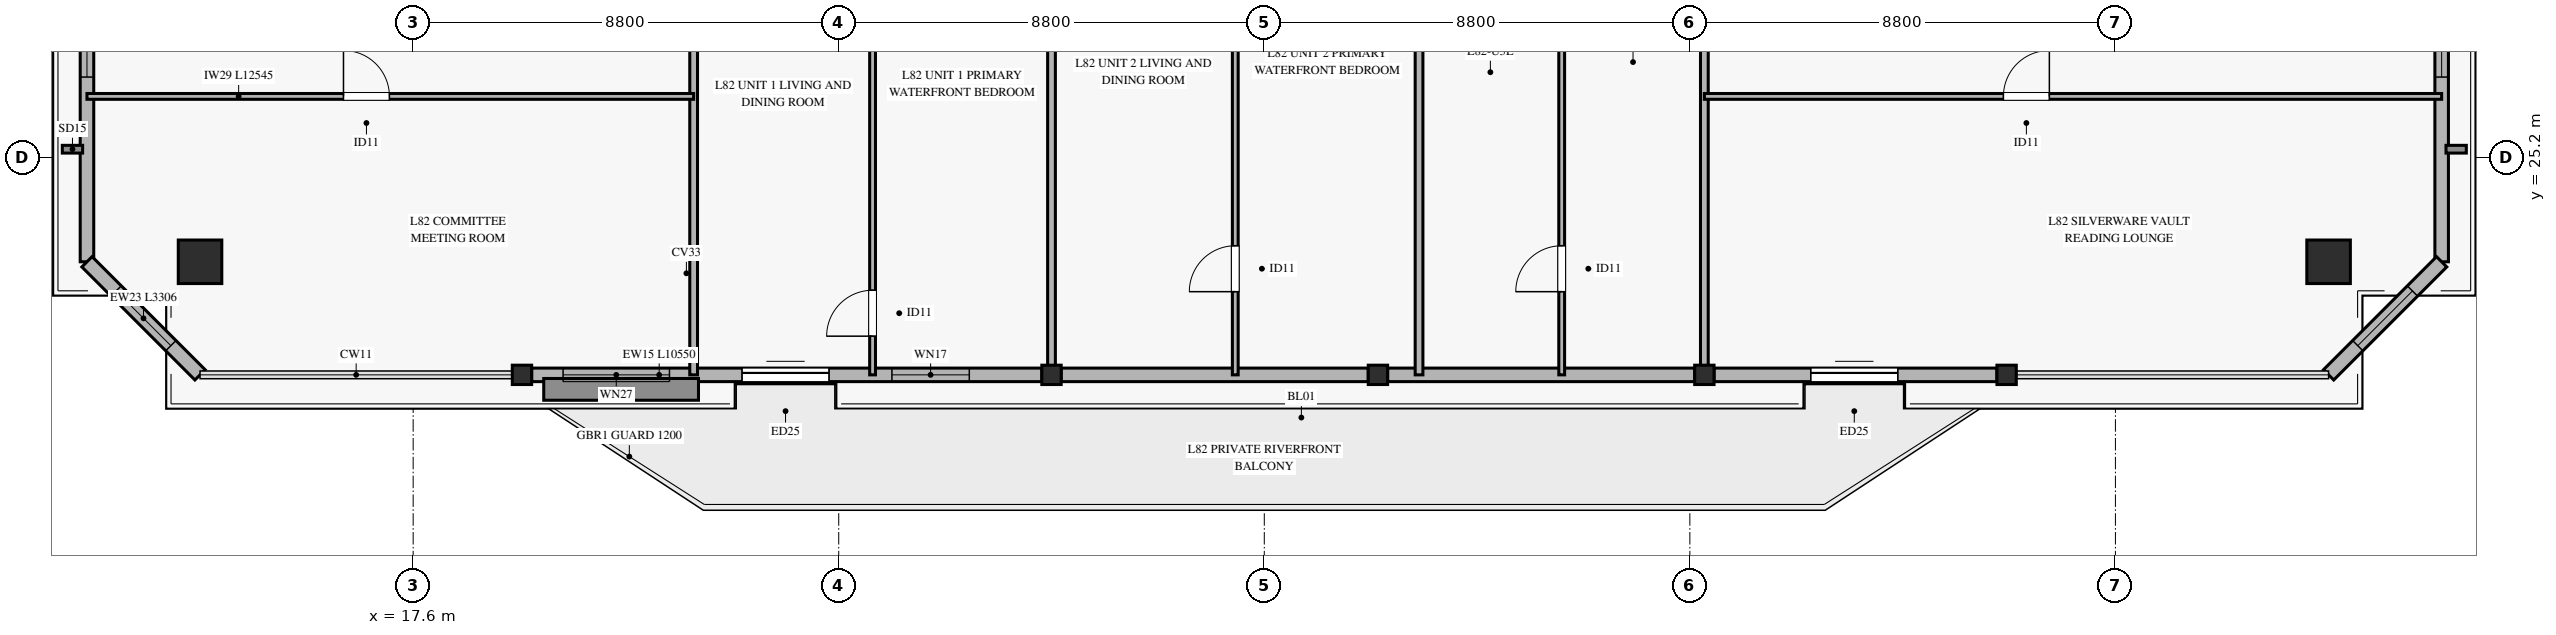
"""IFC4 building model, lengths in metres.
Left out: names, types, materials, properties, quantities, classifications, styles, units other than length and angle.
Written with IfcOpenShell. Run it as: python <this file> out.ifc"""

import sys

from ifc_helpers import new_model, si_unit, direction, frame, frame_2d, origin, origin_2d, place, context, subcontext, project, spatial, rectangle, hollow_rectangle, extrude, source, transform, mapped, element, fill, save


model = new_model("IFC4")
c1 = context("Model", 3, precision=1e-05, world=origin(), true_north=direction((0.0, 1.0)))
c2 = subcontext(c1, "Body", "Model", "MODEL_VIEW")
j1 = project(units=[si_unit("LENGTHUNIT", "METRE"), si_unit("PLANEANGLEUNIT", "RADIAN")], contexts=[c1])
p1 = place(None, origin())
s1 = spatial("IfcSite", under=j1, at=p1, CompositionType="ELEMENT")
p2 = place(p1, origin())
s2 = spatial("IfcBuilding", under=s1, at=p2, CompositionType="ELEMENT")
p3 = place(p2, frame((0.0, 0.0, 317.6)))
s3 = spatial("IfcBuildingStorey", under=s2, at=p3, CompositionType="ELEMENT", Elevation=317.6)
m1 = source(origin(), c2, "Body", "SweptSolid", [
    extrude(hollow_rectangle(XDim=0.9, YDim=0.9, WallThickness=0.04, at=origin_2d()), origin(), (0.0, 0.0, 1.0), 3.185),
])
for number, where, z_axis, x_axis in (
    (1, (13.193, 23.042, 0.0), (0.0, 0.0, 1.0), (1.0, 0.0, 0.0)),
    (2, (57.208, 23.042, 0.0), (0.0, 0.0, 1.0), (1.0, 0.0, 0.0)),
):
    element("IfcColumn", number, at=place(p3, frame(where, z_axis=z_axis, x_axis=x_axis)), inside=s3, PredefinedType="COLUMN", context=c2, shape_type="MappedRepresentation", body=[
        mapped(m1, transform((0.0, 0.0, 0.0), x_axis=(1.0, 0.0, 0.0), y_axis=(0.0, 1.0, 0.0), z_axis=(0.0, 0.0, 1.0), scale=1.0)),
    ])
m2 = source(origin(), c2, "Body", "SweptSolid", [
    extrude(hollow_rectangle(XDim=0.4, YDim=0.4, WallThickness=0.02, at=origin_2d()), origin(), (0.0, 0.0, 1.0), 3.185),
])
for number, where, z_axis, x_axis in (
    (3, (19.85, 20.704, 0.0), (0.0, 0.0, 1.0), (1.0, 0.0, 0.0)),
    (4, (30.8, 20.704, 0.0), (0.0, 0.0, 1.0), (1.0, 0.0, 0.0)),
    (5, (37.55, 20.704, 0.0), (0.0, 0.0, 1.0), (1.0, 0.0, 0.0)),
    (6, (44.3, 20.704, 0.0), (0.0, 0.0, 1.0), (1.0, 0.0, 0.0)),
    (7, (50.55, 20.704, 0.0), (0.0, 0.0, 1.0), (1.0, 0.0, 0.0)),
):
    element("IfcColumn", number, at=place(p3, frame(where, z_axis=z_axis, x_axis=x_axis)), inside=s3, PredefinedType="COLUMN", context=c2, shape_type="MappedRepresentation", body=[
        mapped(m2, transform((0.0, 0.0, 0.0), x_axis=(1.0, 0.0, 0.0), y_axis=(0.0, 1.0, 0.0), z_axis=(0.0, 0.0, 1.0), scale=1.0)),
    ])
p4 = place(p3, frame((20.05, 20.704, 0.0), z_axis=(0.0, 0.0, 1.0), x_axis=(1.0, 0.0, 0.0)))
e8 = element("IfcWall", 8, at=p4, inside=s3, PredefinedType="SOLIDWALL", context=c2, shape_type="SweptSolid", body=[
    extrude(rectangle(XDim=10.55, YDim=0.28, at=frame_2d((5.275, 0.0))), origin(), (0.0, 0.0, 1.0), 2.815),
])
p5 = place(p4, frame((4.35, 0.0, 0.0)))
e9 = element("IfcOpeningElement", 9, at=p5, cuts=e8, PredefinedType="OPENING", context=c2, shape_type="SweptSolid", body=[
    extrude(rectangle(XDim=1.8, YDim=2.25, at=frame_2d((0.9, 1.125))), frame((0.0, 0.15, 0.0), z_axis=(0.0, -1.0, 0.0), x_axis=(1.0, 0.0, 0.0)), (0.0, 0.0, 1.0), 0.3),
])
p6 = place(p4, frame((0.65, 0.0, 0.45)))
e10 = element("IfcOpeningElement", 10, at=p6, cuts=e8, PredefinedType="OPENING", context=c2, shape_type="SweptSolid", body=[
    extrude(rectangle(XDim=2.2, YDim=2.1, at=frame_2d((1.1, 1.05))), frame((0.0, 0.15, 0.0), z_axis=(0.0, -1.0, 0.0), x_axis=(1.0, 0.0, 0.0)), (0.0, 0.0, 1.0), 0.3),
])
p7 = place(p4, frame((7.45, 0.0, 0.45)))
e11 = element("IfcOpeningElement", 11, at=p7, cuts=e8, PredefinedType="OPENING", context=c2, shape_type="SweptSolid", body=[
    extrude(rectangle(XDim=1.6, YDim=2.0, at=frame_2d((0.8, 1.0))), frame((0.0, 0.15, 0.0), z_axis=(0.0, -1.0, 0.0), x_axis=(1.0, 0.0, 0.0)), (0.0, 0.0, 1.0), 0.3),
])
for number, where, z_axis, x_axis in (
    (12, (31.0, 20.704, 0.0), (0.0, 0.0, 1.0), (1.0, 0.0, 0.0)),
    (13, (37.75, 20.704, 0.0), (0.0, 0.0, 1.0), (1.0, 0.0, 0.0)),
):
    element("IfcWall", number, at=place(p3, frame(where, z_axis=z_axis, x_axis=x_axis)), inside=s3, PredefinedType="SOLIDWALL", context=c2, shape_type="SweptSolid", body=[
        extrude(rectangle(XDim=6.35, YDim=0.28, at=frame_2d((3.175, 0.0))), origin(), (0.0, 0.0, 1.0), 2.815),
    ])
p8 = place(p3, frame((44.5, 20.704, 0.0), z_axis=(0.0, 0.0, 1.0), x_axis=(1.0, 0.0, 0.0)))
e14 = element("IfcWall", 14, at=p8, inside=s3, PredefinedType="SOLIDWALL", context=c2, shape_type="SweptSolid", body=[
    extrude(rectangle(XDim=5.85, YDim=0.28, at=frame_2d((2.925, 0.0))), origin(), (0.0, 0.0, 1.0), 2.815),
])
p9 = place(p8, frame((2.0, 0.0, 0.0)))
e15 = element("IfcOpeningElement", 15, at=p9, cuts=e14, PredefinedType="OPENING", context=c2, shape_type="SweptSolid", body=[
    extrude(rectangle(XDim=1.8, YDim=2.25, at=frame_2d((0.9, 1.125))), frame((0.0, 0.15, 0.0), z_axis=(0.0, -1.0, 0.0), x_axis=(1.0, 0.0, 0.0)), (0.0, 0.0, 1.0), 0.3),
])
p10 = place(p3, frame((10.855, 23.042, 0.0), z_axis=(0.0, 0.0, 1.0), x_axis=(0.0, 1.0, 0.0)))
e16 = element("IfcWall", 16, at=p10, inside=s3, PredefinedType="SOLIDWALL", context=c2, shape_type="SweptSolid", body=[
    extrude(rectangle(XDim=10.16, YDim=0.28, at=frame_2d((5.08, 0.0))), origin(), (0.0, 0.0, 1.0), 2.815),
])
p11 = place(p10, frame((3.82, 0.0, 0.45)))
e17 = element("IfcOpeningElement", 17, at=p11, cuts=e16, PredefinedType="OPENING", context=c2, shape_type="SweptSolid", body=[
    extrude(rectangle(XDim=2.2, YDim=2.1, at=frame_2d((1.1, 1.05))), frame((0.0, 0.15, 0.0), z_axis=(0.0, -1.0, 0.0), x_axis=(1.0, 0.0, 0.0)), (0.0, 0.0, 1.0), 0.3),
])
p12 = place(p3, frame((59.546, 23.042, 0.0), z_axis=(0.0, 0.0, 1.0), x_axis=(0.0, 1.0, 0.0)))
e18 = element("IfcWall", 18, at=p12, inside=s3, PredefinedType="SOLIDWALL", context=c2, shape_type="SweptSolid", body=[
    extrude(rectangle(XDim=10.16, YDim=0.28, at=frame_2d((5.08, 0.0))), origin(), (0.0, 0.0, 1.0), 2.815),
])
p13 = place(p12, frame((3.82, 0.0, 0.45)))
e19 = element("IfcOpeningElement", 19, at=p13, cuts=e18, PredefinedType="OPENING", context=c2, shape_type="SweptSolid", body=[
    extrude(rectangle(XDim=2.2, YDim=2.1, at=frame_2d((1.1, 1.05))), frame((0.0, 0.15, 0.0), z_axis=(0.0, -1.0, 0.0), x_axis=(1.0, 0.0, 0.0)), (0.0, 0.0, 1.0), 0.3),
])
p14 = place(p3, frame((10.855, 23.042, 0.0), z_axis=(0.0, 0.0, 1.0), x_axis=(0.707143699075, -0.70706986137, 0.0)))
e20 = element("IfcWall", 20, at=p14, inside=s3, PredefinedType="SOLIDWALL", context=c2, shape_type="SweptSolid", body=[
    extrude(rectangle(XDim=3.306, YDim=0.3, at=frame_2d((1.653, 0.0))), origin(), (0.0, 0.0, 1.0), 2.815),
])
p15 = place(p14, frame((0.853, 0.0, 0.45)))
e21 = element("IfcOpeningElement", 21, at=p15, cuts=e20, PredefinedType="OPENING", context=c2, shape_type="SweptSolid", body=[
    extrude(rectangle(XDim=1.6, YDim=2.0, at=frame_2d((0.8, 1.0))), frame((0.0, 0.16, 0.0), z_axis=(0.0, -1.0, 0.0), x_axis=(1.0, 0.0, 0.0)), (0.0, 0.0, 1.0), 0.32),
])
p16 = place(p3, frame((57.208, 20.704, 0.0), z_axis=(0.0, 0.0, 1.0), x_axis=(0.707106781187, 0.707106781187, 0.0)))
e22 = element("IfcWall", 22, at=p16, inside=s3, PredefinedType="SOLIDWALL", context=c2, shape_type="SweptSolid", body=[
    extrude(rectangle(XDim=3.306, YDim=0.3, at=frame_2d((1.653, 0.0))), origin(), (0.0, 0.0, 1.0), 2.815),
])
p17 = place(p16, frame((0.853, 0.0, 0.45)))
e23 = element("IfcOpeningElement", 23, at=p17, cuts=e22, PredefinedType="OPENING", context=c2, shape_type="SweptSolid", body=[
    extrude(rectangle(XDim=1.6, YDim=2.0, at=frame_2d((0.8, 1.0))), frame((0.0, 0.16, 0.0), z_axis=(0.0, -1.0, 0.0), x_axis=(1.0, 0.0, 0.0)), (0.0, 0.0, 1.0), 0.32),
])
p18 = place(p3, frame((23.4, 20.704, 0.0), z_axis=(0.0, 0.0, 1.0), x_axis=(0.0, 1.0, 0.0)))
e24 = element("IfcWall", 24, at=p18, inside=s3, PredefinedType="PARTITIONING", context=c2, shape_type="SweptSolid", body=[
    extrude(rectangle(XDim=16.746, YDim=0.16, at=frame_2d((8.373, 0.0))), origin(), (0.0, 0.0, 1.0), 2.77),
])
p19 = place(p18, frame((13.766, 0.0, 0.0)))
e25 = element("IfcOpeningElement", 25, at=p19, cuts=e24, PredefinedType="OPENING", context=c2, shape_type="SweptSolid", body=[
    extrude(rectangle(XDim=1.05, YDim=2.15, at=frame_2d((0.525, 1.075))), frame((0.0, 0.09, 0.0), z_axis=(0.0, -1.0, 0.0), x_axis=(1.0, 0.0, 0.0)), (0.0, 0.0, 1.0), 0.18),
])
p20 = place(p3, frame((30.8, 20.704, 0.0), z_axis=(0.0, 0.0, 1.0), x_axis=(0.0, 1.0, 0.0)))
e26 = element("IfcWall", 26, at=p20, inside=s3, PredefinedType="PARTITIONING", context=c2, shape_type="SweptSolid", body=[
    extrude(rectangle(XDim=13.346, YDim=0.16, at=frame_2d((6.673, 0.0))), origin(), (0.0, 0.0, 1.0), 2.47),
])
p21 = place(p3, frame((38.4, 20.704, 0.0), z_axis=(0.0, 0.0, 1.0), x_axis=(0.0, 1.0, 0.0)))
e27 = element("IfcWall", 27, at=p21, inside=s3, PredefinedType="PARTITIONING", context=c2, shape_type="SweptSolid", body=[
    extrude(rectangle(XDim=13.346, YDim=0.16, at=frame_2d((6.673, 0.0))), origin(), (0.0, 0.0, 1.0), 2.77),
])
p22 = place(p3, frame((44.3, 20.704, 0.0), z_axis=(0.0, 0.0, 1.0), x_axis=(0.0, 1.0, 0.0)))
e28 = element("IfcWall", 28, at=p22, inside=s3, PredefinedType="PARTITIONING", context=c2, shape_type="SweptSolid", body=[
    extrude(rectangle(XDim=16.746, YDim=0.16, at=frame_2d((8.373, 0.0))), origin(), (0.0, 0.0, 1.0), 2.47),
])
p23 = place(p22, frame((13.766, 0.0, 0.0)))
e29 = element("IfcOpeningElement", 29, at=p23, cuts=e28, PredefinedType="OPENING", context=c2, shape_type="SweptSolid", body=[
    extrude(rectangle(XDim=1.05, YDim=2.15, at=frame_2d((0.525, 1.075))), frame((0.0, 0.09, 0.0), z_axis=(0.0, -1.0, 0.0), x_axis=(1.0, 0.0, 0.0)), (0.0, 0.0, 1.0), 0.18),
])
p24 = place(p3, frame((10.855, 26.462, 0.0), z_axis=(0.0, 0.0, 1.0), x_axis=(1.0, 0.0, 0.0)))
e30 = element("IfcWall", 30, at=p24, inside=s3, PredefinedType="PARTITIONING", context=c2, shape_type="SweptSolid", body=[
    extrude(rectangle(XDim=12.545, YDim=0.12, at=frame_2d((6.272, 0.0))), origin(), (0.0, 0.0, 1.0), 2.47),
])
p25 = place(p24, frame((5.304, 0.0, 0.0)))
e31 = element("IfcOpeningElement", 31, at=p25, cuts=e30, PredefinedType="OPENING", context=c2, shape_type="SweptSolid", body=[
    extrude(rectangle(XDim=0.95, YDim=2.1, at=frame_2d((0.475, 1.05))), frame((0.0, 0.07, 0.0), z_axis=(0.0, -1.0, 0.0), x_axis=(1.0, 0.0, 0.0)), (0.0, 0.0, 1.0), 0.14),
])
p26 = place(p3, frame((27.1, 20.704, 0.0), z_axis=(0.0, 0.0, 1.0), x_axis=(0.0, 1.0, 0.0)))
e32 = element("IfcWall", 32, at=p26, inside=s3, PredefinedType="PARTITIONING", context=c2, shape_type="SweptSolid", body=[
    extrude(rectangle(XDim=10.696, YDim=0.12, at=frame_2d((5.348, 0.0))), origin(), (0.0, 0.0, 1.0), 2.77),
])
p27 = place(p26, frame((0.8, 0.0, 0.0)))
e33 = element("IfcOpeningElement", 33, at=p27, cuts=e32, PredefinedType="OPENING", context=c2, shape_type="SweptSolid", body=[
    extrude(rectangle(XDim=0.95, YDim=2.1, at=frame_2d((0.475, 1.05))), frame((0.0, 0.07, 0.0), z_axis=(0.0, -1.0, 0.0), x_axis=(1.0, 0.0, 0.0)), (0.0, 0.0, 1.0), 0.14),
])
p28 = place(p3, frame((34.6, 20.704, 0.0), z_axis=(0.0, 0.0, 1.0), x_axis=(0.0, 1.0, 0.0)))
e34 = element("IfcWall", 34, at=p28, inside=s3, PredefinedType="PARTITIONING", context=c2, shape_type="SweptSolid", body=[
    extrude(rectangle(XDim=10.696, YDim=0.12, at=frame_2d((5.348, 0.0))), origin(), (0.0, 0.0, 1.0), 2.77),
])
p29 = place(p28, frame((1.72, 0.0, 0.0)))
e35 = element("IfcOpeningElement", 35, at=p29, cuts=e34, PredefinedType="OPENING", context=c2, shape_type="SweptSolid", body=[
    extrude(rectangle(XDim=0.95, YDim=2.1, at=frame_2d((0.475, 1.05))), frame((0.0, 0.07, 0.0), z_axis=(0.0, -1.0, 0.0), x_axis=(1.0, 0.0, 0.0)), (0.0, 0.0, 1.0), 0.14),
])
p30 = place(p3, frame((41.35, 20.704, 0.0), z_axis=(0.0, 0.0, 1.0), x_axis=(0.0, 1.0, 0.0)))
e36 = element("IfcWall", 36, at=p30, inside=s3, PredefinedType="PARTITIONING", context=c2, shape_type="SweptSolid", body=[
    extrude(rectangle(XDim=10.696, YDim=0.12, at=frame_2d((5.348, 0.0))), origin(), (0.0, 0.0, 1.0), 2.77),
])
p31 = place(p30, frame((1.72, 0.0, 0.0)))
e37 = element("IfcOpeningElement", 37, at=p31, cuts=e36, PredefinedType="OPENING", context=c2, shape_type="SweptSolid", body=[
    extrude(rectangle(XDim=0.95, YDim=2.1, at=frame_2d((0.475, 1.05))), frame((0.0, 0.07, 0.0), z_axis=(0.0, -1.0, 0.0), x_axis=(1.0, 0.0, 0.0)), (0.0, 0.0, 1.0), 0.14),
])
p32 = place(p3, frame((44.3, 26.462, 0.0), z_axis=(0.0, 0.0, 1.0), x_axis=(1.0, 0.0, 0.0)))
e38 = element("IfcWall", 38, at=p32, inside=s3, PredefinedType="PARTITIONING", context=c2, shape_type="SweptSolid", body=[
    extrude(rectangle(XDim=15.246, YDim=0.12, at=frame_2d((7.623, 0.0))), origin(), (0.0, 0.0, 1.0), 2.47),
])
p33 = place(p32, frame((6.184, 0.0, 0.0)))
e39 = element("IfcOpeningElement", 39, at=p33, cuts=e38, PredefinedType="OPENING", context=c2, shape_type="SweptSolid", body=[
    extrude(rectangle(XDim=0.95, YDim=2.1, at=frame_2d((0.475, 1.05))), frame((0.0, 0.07, 0.0), z_axis=(0.0, -1.0, 0.0), x_axis=(1.0, 0.0, 0.0)), (0.0, 0.0, 1.0), 0.14),
])
m3 = source(origin(), c2, "Body", "SweptSolid", [
    extrude(rectangle(XDim=1.8, YDim=2.25, at=frame_2d((0.9, 1.125))), frame((0.0, 0.025, 0.0), z_axis=(0.0, -1.0, 0.0), x_axis=(1.0, 0.0, 0.0)), (0.0, 0.0, 1.0), 0.05),
])
p34 = place(p5, origin())
e40 = element("IfcDoor", 40, at=p34, inside=s3, OperationType="SLIDING_TO_LEFT", PredefinedType="DOOR", context=c2, shape_type="MappedRepresentation", body=[
    mapped(m3, transform((0.0, 0.0, 0.0), x_axis=(1.0, 0.0, 0.0), y_axis=(0.0, 1.0, 0.0), z_axis=(0.0, 0.0, 1.0), scale=1.0)),
])
fill(e9, e40)
m4 = source(origin(), c2, "Body", "SweptSolid", [
    extrude(rectangle(XDim=2.2, YDim=2.1, at=frame_2d((1.1, 1.05))), frame((0.0, 0.03, 0.0), z_axis=(0.0, -1.0, 0.0), x_axis=(1.0, 0.0, 0.0)), (0.0, 0.0, 1.0), 0.06),
])
p35 = place(p6, origin())
e41 = element("IfcWindow", 41, at=p35, inside=s3, PartitioningType="SINGLE_PANEL", PredefinedType="WINDOW", context=c2, shape_type="MappedRepresentation", body=[
    mapped(m4, transform((0.0, 0.0, 0.0), x_axis=(1.0, 0.0, 0.0), y_axis=(0.0, 1.0, 0.0), z_axis=(0.0, 0.0, 1.0), scale=1.0)),
])
fill(e10, e41)
m5 = source(origin(), c2, "Body", "SweptSolid", [
    extrude(rectangle(XDim=1.6, YDim=2.0, at=frame_2d((0.8, 1.0))), frame((0.0, 0.03, 0.0), z_axis=(0.0, -1.0, 0.0), x_axis=(1.0, 0.0, 0.0)), (0.0, 0.0, 1.0), 0.06),
])
p36 = place(p7, origin())
e42 = element("IfcWindow", 42, at=p36, inside=s3, PartitioningType="SINGLE_PANEL", PredefinedType="WINDOW", context=c2, shape_type="MappedRepresentation", body=[
    mapped(m5, transform((0.0, 0.0, 0.0), x_axis=(1.0, 0.0, 0.0), y_axis=(0.0, 1.0, 0.0), z_axis=(0.0, 0.0, 1.0), scale=1.0)),
])
fill(e11, e42)
p37 = place(p9, origin())
e43 = element("IfcDoor", 43, at=p37, inside=s3, OperationType="SLIDING_TO_LEFT", PredefinedType="DOOR", context=c2, shape_type="MappedRepresentation", body=[
    mapped(m3, transform((0.0, 0.0, 0.0), x_axis=(1.0, 0.0, 0.0), y_axis=(0.0, 1.0, 0.0), z_axis=(0.0, 0.0, 1.0), scale=1.0)),
])
fill(e15, e43)
p38 = place(p11, origin())
e44 = element("IfcWindow", 44, at=p38, inside=s3, PartitioningType="SINGLE_PANEL", PredefinedType="WINDOW", context=c2, shape_type="MappedRepresentation", body=[
    mapped(m4, transform((0.0, 0.0, 0.0), x_axis=(1.0, 0.0, 0.0), y_axis=(0.0, 1.0, 0.0), z_axis=(0.0, 0.0, 1.0), scale=1.0)),
])
fill(e17, e44)
p39 = place(p13, origin())
e45 = element("IfcWindow", 45, at=p39, inside=s3, PartitioningType="SINGLE_PANEL", PredefinedType="WINDOW", context=c2, shape_type="MappedRepresentation", body=[
    mapped(m4, transform((0.0, 0.0, 0.0), x_axis=(1.0, 0.0, 0.0), y_axis=(0.0, 1.0, 0.0), z_axis=(0.0, 0.0, 1.0), scale=1.0)),
])
fill(e19, e45)
p40 = place(p15, origin())
e46 = element("IfcWindow", 46, at=p40, inside=s3, PartitioningType="SINGLE_PANEL", PredefinedType="WINDOW", context=c2, shape_type="MappedRepresentation", body=[
    mapped(m5, transform((0.0, 0.0, 0.0), x_axis=(1.0, 0.0, 0.0), y_axis=(0.0, 1.0, 0.0), z_axis=(0.0, 0.0, 1.0), scale=1.0)),
])
fill(e21, e46)
p41 = place(p17, origin())
e47 = element("IfcWindow", 47, at=p41, inside=s3, PartitioningType="SINGLE_PANEL", PredefinedType="WINDOW", context=c2, shape_type="MappedRepresentation", body=[
    mapped(m5, transform((0.0, 0.0, 0.0), x_axis=(1.0, 0.0, 0.0), y_axis=(0.0, 1.0, 0.0), z_axis=(0.0, 0.0, 1.0), scale=1.0)),
])
fill(e23, e47)
m6 = source(origin(), c2, "Body", "SweptSolid", [
    extrude(rectangle(XDim=0.95, YDim=2.1, at=frame_2d((0.475, 1.05))), frame((0.0, 0.025, 0.0), z_axis=(0.0, -1.0, 0.0), x_axis=(1.0, 0.0, 0.0)), (0.0, 0.0, 1.0), 0.05),
])
p42 = place(p25, origin())
e48 = element("IfcDoor", 48, at=p42, inside=s3, OperationType="SINGLE_SWING_LEFT", PredefinedType="DOOR", context=c2, shape_type="MappedRepresentation", body=[
    mapped(m6, transform((0.0, 0.0, 0.0), x_axis=(1.0, 0.0, 0.0), y_axis=(0.0, 1.0, 0.0), z_axis=(0.0, 0.0, 1.0), scale=1.0)),
])
fill(e31, e48)
p43 = place(p27, origin())
e49 = element("IfcDoor", 49, at=p43, inside=s3, OperationType="SINGLE_SWING_LEFT", PredefinedType="DOOR", context=c2, shape_type="MappedRepresentation", body=[
    mapped(m6, transform((0.0, 0.0, 0.0), x_axis=(1.0, 0.0, 0.0), y_axis=(0.0, 1.0, 0.0), z_axis=(0.0, 0.0, 1.0), scale=1.0)),
])
fill(e33, e49)
p44 = place(p29, origin())
e50 = element("IfcDoor", 50, at=p44, inside=s3, OperationType="SINGLE_SWING_LEFT", PredefinedType="DOOR", context=c2, shape_type="MappedRepresentation", body=[
    mapped(m6, transform((0.0, 0.0, 0.0), x_axis=(1.0, 0.0, 0.0), y_axis=(0.0, 1.0, 0.0), z_axis=(0.0, 0.0, 1.0), scale=1.0)),
])
fill(e35, e50)
p45 = place(p31, origin())
e51 = element("IfcDoor", 51, at=p45, inside=s3, OperationType="SINGLE_SWING_LEFT", PredefinedType="DOOR", context=c2, shape_type="MappedRepresentation", body=[
    mapped(m6, transform((0.0, 0.0, 0.0), x_axis=(1.0, 0.0, 0.0), y_axis=(0.0, 1.0, 0.0), z_axis=(0.0, 0.0, 1.0), scale=1.0)),
])
fill(e37, e51)
p46 = place(p33, origin())
e52 = element("IfcDoor", 52, at=p46, inside=s3, OperationType="SINGLE_SWING_RIGHT", PredefinedType="DOOR", context=c2, shape_type="MappedRepresentation", body=[
    mapped(m6, transform((0.0, 0.0, 0.0), x_axis=(1.0, 0.0, 0.0), y_axis=(0.0, 1.0, 0.0), z_axis=(0.0, 0.0, 1.0), scale=1.0)),
])
fill(e39, e52)
save(model, sys.argv[1])
